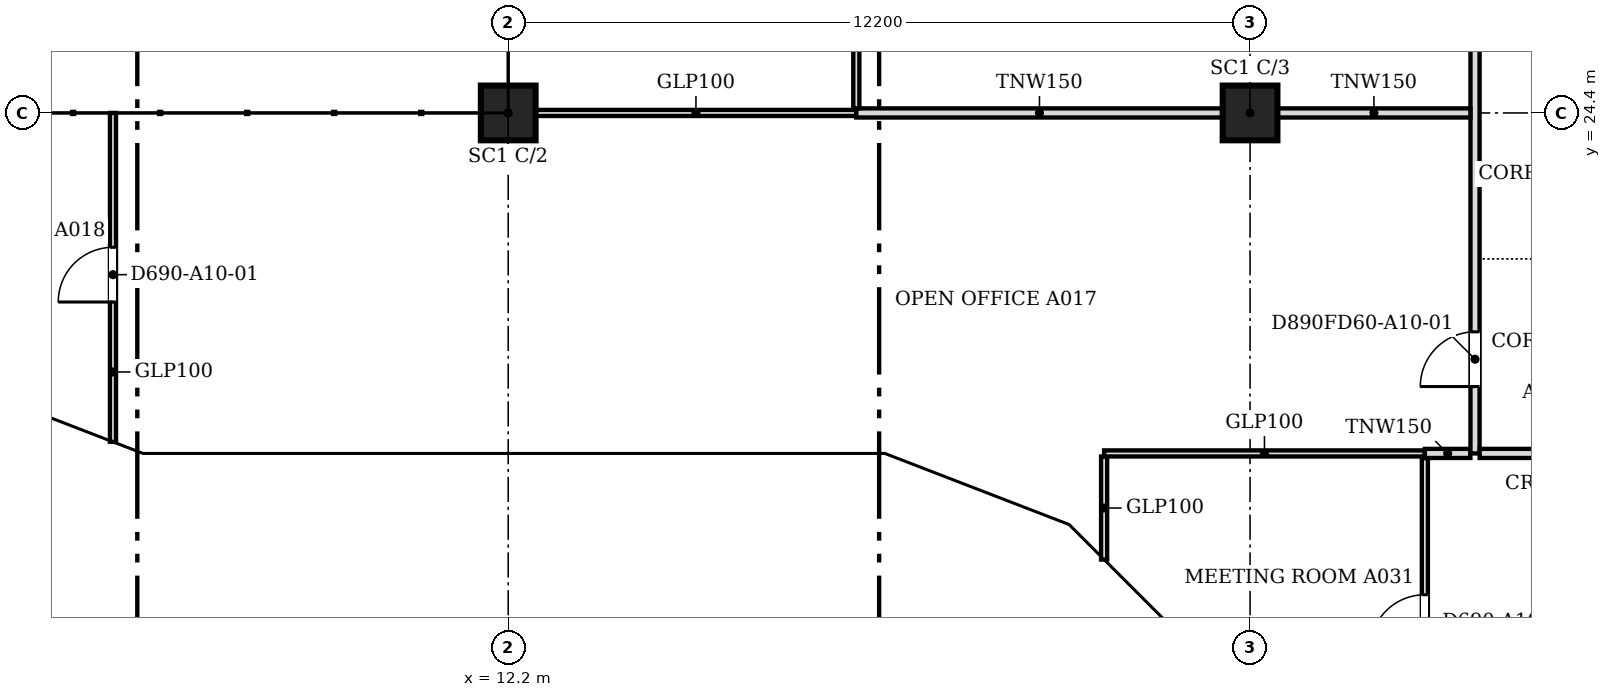
"""IFC4 building model, lengths in metres.
Left out: names, types, materials, properties, quantities, classifications, styles, units other than length and angle.
Written with IfcOpenShell. Run it as: python <this file> out.ifc"""

import sys

from ifc_helpers import new_model, si_unit, direction, frame, frame_2d, origin, origin_2d, place, context, subcontext, project, spatial, polyline, rectangle, outline, extrude, faceted_brep, source, transform, mapped, element, fill, save


model = new_model("IFC4")
c1 = context("Model", 3, precision=1e-05, world=origin(), true_north=direction((0.0, 1.0)))
c2 = subcontext(c1, "Body", "Model", "MODEL_VIEW")
j1 = project(units=[si_unit("LENGTHUNIT", "METRE"), si_unit("PLANEANGLEUNIT", "RADIAN")], contexts=[c1])
p1 = place(None, origin())
s1 = spatial("IfcSite", under=j1, at=p1, CompositionType="ELEMENT")
p2 = place(p1, origin())
s2 = spatial("IfcBuilding", under=s1, at=p2, CompositionType="ELEMENT")
p3 = place(p2, frame((0.0, 0.0, 112.6)))
s3 = spatial("IfcBuildingStorey", under=s2, at=p3, CompositionType="ELEMENT", Elevation=112.6)
for number, where, z_axis, x_axis in (
    (1, (12.2, 24.4, 0.0), (0.0, 0.0, 1.0), (1.0, 0.0, 0.0)),
    (2, (24.4, 24.4, 0.0), (0.0, 0.0, 1.0), (1.0, 0.0, 0.0)),
):
    element("IfcColumn", number, at=place(p3, frame(where, z_axis=z_axis, x_axis=x_axis)), inside=s3, PredefinedType="COLUMN", context=c2, shape_type="SweptSolid", body=[
        extrude(rectangle(XDim=0.9, YDim=0.9, at=origin_2d()), origin(), (0.0, 0.0, 1.0), 3.6),
    ])
m1 = source(origin(), c2, "Body", "Brep", [
    faceted_brep([(2.997, -0.25, 3.741), (2.95, -0.25, 3.8), (0.0, -0.25, 0.0), (2.997, -0.25, 0.0), (0.053, 0.25, 0.068), (2.904, 0.25, 3.74), (2.904, 0.25, 0.0), (0.053, 0.25, 0.0), (2.95, 0.0, 3.8), (0.0, 0.0, 0.0)], [[[0, 1, 2, 3]], [[4, 5, 6, 7]], [[8, 1, 0]], [[5, 4, 9, 2, 1, 8]], [[7, 6, 3, 2, 9]], [[7, 9, 4]], [[3, 6, 5, 8, 0]]]),
])
p4 = place(p3, frame((3.394, 19.612, 0.0), z_axis=(0.0, 0.0, 1.0), x_axis=(0.932990326376, -0.359901446078, 0.0)))
e3 = element("IfcWall", 3, at=p4, inside=s3, PredefinedType="SOLIDWALL", context=c2, shape_type="MappedRepresentation", body=[
    mapped(m1, transform((0.0, 0.0, 0.0), scale=1.0)),
])
m2 = source(origin(), c2, "Body", "SweptSolid", [
    extrude(outline(polyline([(2.75, 3.135), (0.511, 0.25), (2.75, 0.25), (2.75, 3.135)])), frame((0.0, 0.26, 0.0), z_axis=(0.0, -1.0, 0.0), x_axis=(1.0, 0.0, 0.0)), (0.0, 0.0, 1.0), 0.52),
])
p5 = place(p4, origin())
e4 = element("IfcOpeningElement", 4, at=p5, cuts=e3, PredefinedType="OPENING", context=c2, shape_type="MappedRepresentation", body=[
    mapped(m2, transform((0.0, 0.0, 0.0), scale=1.0)),
])
m3 = source(origin(), c2, "Body", "Brep", [
    faceted_brep([(3.05, -0.25, 0.0), (0.047, -0.25, 3.8), (0.0, -0.25, 3.74), (0.0, -0.25, 0.0), (0.093, 0.25, 3.741), (3.05, 0.25, 0.0), (0.093, 0.25, 0.0), (0.047, 0.0, 3.8)], [[[0, 1, 2, 3]], [[4, 5, 6]], [[5, 4, 7, 1, 0]], [[2, 1, 7]], [[6, 5, 0, 3]], [[6, 3, 2, 7, 4]]]),
])
p6 = place(p3, frame((6.1, 18.55, 0.0), z_axis=(0.0, 0.0, 1.0), x_axis=(1.0, 0.0, 0.0)))
e5 = element("IfcWall", 5, at=p6, inside=s3, PredefinedType="SOLIDWALL", context=c2, shape_type="MappedRepresentation", body=[
    mapped(m3, transform((0.0, 0.0, 0.0), scale=1.0)),
])
m4 = source(origin(), c2, "Body", "SweptSolid", [
    extrude(outline(polyline([(2.534, 0.25), (0.247, 3.144), (0.247, 0.25), (2.534, 0.25)])), frame((0.0, 0.26, 0.0), z_axis=(0.0, -1.0, 0.0), x_axis=(1.0, 0.0, 0.0)), (0.0, 0.0, 1.0), 0.52),
])
p7 = place(p6, origin())
e6 = element("IfcOpeningElement", 6, at=p7, cuts=e5, PredefinedType="OPENING", context=c2, shape_type="MappedRepresentation", body=[
    mapped(m4, transform((0.0, 0.0, 0.0), scale=1.0)),
])
m5 = source(origin(), c2, "Body", "SweptSolid", [
    extrude(outline(polyline([(6.1, 0.0), (3.05, 3.8), (0.0, 0.0), (6.1, 0.0)])), frame((0.0, 0.25, 0.0), z_axis=(0.0, -1.0, 0.0), x_axis=(1.0, 0.0, 0.0)), (0.0, 0.0, 1.0), 0.5),
])
p8 = place(p3, frame((9.15, 18.55, 0.0), z_axis=(0.0, 0.0, 1.0), x_axis=(1.0, 0.0, 0.0)))
e7 = element("IfcWall", 7, at=p8, inside=s3, PredefinedType="SOLIDWALL", context=c2, shape_type="MappedRepresentation", body=[
    mapped(m5, transform((0.0, 0.0, 0.0), scale=1.0)),
])
m6 = source(origin(), c2, "Body", "SweptSolid", [
    extrude(outline(polyline([(5.579, 0.25), (3.05, 3.4), (0.521, 0.25), (5.579, 0.25)])), frame((0.0, 0.26, 0.0), z_axis=(0.0, -1.0, 0.0), x_axis=(1.0, 0.0, 0.0)), (0.0, 0.0, 1.0), 0.52),
])
p9 = place(p8, origin())
e8 = element("IfcOpeningElement", 8, at=p9, cuts=e7, PredefinedType="OPENING", context=c2, shape_type="MappedRepresentation", body=[
    mapped(m6, transform((0.0, 0.0, 0.0), scale=1.0)),
])
m7 = source(origin(), c2, "Body", "Brep", [
    faceted_brep([(3.05, -0.25, 3.743), (0.0, -0.25, 0.0), (3.05, -0.25, 0.0), (0.0, 0.25, 0.0), (3.096, 0.25, 3.8), (3.143, 0.25, 3.743), (3.143, 0.25, 0.0), (3.096, -0.0, 3.8)], [[[0, 1, 2]], [[3, 4, 5, 6]], [[5, 4, 7]], [[4, 3, 1, 0, 7]], [[3, 6, 2, 1]], [[2, 6, 5, 7, 0]]]),
])
p10 = place(p3, frame((15.25, 18.55, 0.0), z_axis=(0.0, 0.0, 1.0), x_axis=(1.0, 0.0, 0.0)))
e9 = element("IfcWall", 9, at=p10, inside=s3, PredefinedType="SOLIDWALL", context=c2, shape_type="MappedRepresentation", body=[
    mapped(m7, transform((0.0, 0.0, 0.0), scale=1.0)),
])
m8 = source(origin(), c2, "Body", "SweptSolid", [
    extrude(outline(polyline([(2.896, 3.159), (0.526, 0.25), (2.896, 0.25), (2.896, 3.159)])), frame((0.0, 0.26, 0.0), z_axis=(0.0, -1.0, 0.0), x_axis=(1.0, 0.0, 0.0)), (0.0, 0.0, 1.0), 0.52),
])
p11 = place(p10, origin())
e10 = element("IfcOpeningElement", 10, at=p11, cuts=e9, PredefinedType="OPENING", context=c2, shape_type="MappedRepresentation", body=[
    mapped(m8, transform((0.0, 0.0, 0.0), scale=1.0)),
])
m9 = source(origin(), c2, "Body", "Brep", [
    faceted_brep([(3.143, -0.25, 0.064), (0.093, -0.25, 3.744), (0.093, -0.25, 0.0), (3.143, -0.25, 0.0), (0.0, 0.25, 3.743), (0.047, 0.25, 3.8), (3.196, 0.25, 0.0), (0.0, 0.25, 0.0), (0.047, 0.0, 3.8), (3.196, -0.0, 0.0)], [[[0, 1, 2, 3]], [[4, 5, 6, 7]], [[6, 5, 8, 1, 0, 9]], [[5, 4, 8]], [[7, 6, 9, 3, 2]], [[7, 2, 1, 8, 4]], [[3, 9, 0]]]),
])
p12 = place(p3, frame((18.303, 18.567, 0.0), z_axis=(0.0, 0.0, 1.0), x_axis=(0.932978940178, -0.359930961693, 0.0)))
e11 = element("IfcWall", 11, at=p12, inside=s3, PredefinedType="SOLIDWALL", context=c2, shape_type="MappedRepresentation", body=[
    mapped(m9, transform((0.0, 0.0, 0.0), scale=1.0)),
])
m10 = source(origin(), c2, "Body", "SweptSolid", [
    extrude(outline(polyline([(2.664, 0.25), (0.247, 3.167), (0.247, 0.25), (2.664, 0.25)])), frame((0.0, 0.26, 0.0), z_axis=(0.0, -1.0, 0.0), x_axis=(1.0, 0.0, 0.0)), (0.0, 0.0, 1.0), 0.52),
])
p13 = place(p12, origin())
e12 = element("IfcOpeningElement", 12, at=p13, cuts=e11, PredefinedType="OPENING", context=c2, shape_type="MappedRepresentation", body=[
    mapped(m10, transform((0.0, 0.0, 0.0), scale=1.0)),
])
m11 = source(origin(), c2, "Body", "Brep", [
    faceted_brep([(3.103, -0.25, 3.736), (0.053, -0.25, 0.064), (0.053, -0.25, 0.0), (3.103, -0.25, 0.0), (0.0, 0.25, 0.0), (3.156, 0.25, 3.8), (3.209, 0.25, 3.736), (3.209, 0.25, 0.0), (3.156, -0.0, 3.8), (0.0, 0.0, 0.0)], [[[0, 1, 2, 3]], [[4, 5, 6, 7]], [[6, 5, 8]], [[5, 4, 9, 1, 0, 8]], [[4, 7, 3, 2, 9]], [[9, 2, 1]], [[3, 7, 6, 8, 0]]]),
])
p14 = place(p3, frame((21.285, 17.417, 0.0), z_axis=(0.0, 0.0, 1.0), x_axis=(0.707106781187, -0.707106781187, 0.0)))
e13 = element("IfcWall", 13, at=p14, inside=s3, PredefinedType="SOLIDWALL", context=c2, shape_type="MappedRepresentation", body=[
    mapped(m11, transform((0.0, 0.0, 0.0), scale=1.0)),
])
m12 = source(origin(), c2, "Body", "SweptSolid", [
    extrude(outline(polyline([(2.956, 3.168), (0.533, 0.25), (2.956, 0.25), (2.956, 3.168)])), frame((0.0, 0.26, 0.0), z_axis=(0.0, -1.0, 0.0), x_axis=(1.0, 0.0, 0.0)), (0.0, 0.0, 1.0), 0.52),
])
p15 = place(p14, origin())
e14 = element("IfcOpeningElement", 14, at=p15, cuts=e13, PredefinedType="OPENING", context=c2, shape_type="MappedRepresentation", body=[
    mapped(m12, transform((0.0, 0.0, 0.0), scale=1.0)),
])
p16 = place(p2, frame((0.0, 0.0, 116.4)))
s4 = spatial("IfcBuildingStorey", under=s2, at=p16, CompositionType="ELEMENT", Elevation=116.4)
m13 = source(origin(), c2, "Body", "Brep", [
    faceted_brep([(0.053, -0.25, 0.0), (3.003, -0.25, 3.8), (0.053, -0.25, 7.6), (0.0, -0.25, 7.531), (0.0, -0.25, 0.068), (0.106, 0.25, 7.532), (2.957, 0.25, 3.86), (2.957, 0.25, 3.74), (0.106, 0.25, 0.068), (3.003, 0.0, 3.8), (0.053, 0.0, 0.0), (0.053, 0.0, 7.6)], [[[0, 1, 2, 3, 4]], [[5, 6, 7, 8]], [[8, 7, 9, 1, 0, 10]], [[6, 5, 11, 2, 1, 9]], [[3, 2, 11]], [[10, 0, 4]], [[8, 10, 4, 3, 11, 5]], [[9, 7, 6]]]),
])
p17 = place(p16, frame((3.344, 19.631, -3.8), z_axis=(0.0, 0.0, 1.0), x_axis=(0.933007896601, -0.359855894603, 0.0)))
e15 = element("IfcWall", 15, at=p17, inside=s4, PredefinedType="SOLIDWALL", context=c2, shape_type="MappedRepresentation", body=[
    mapped(m13, transform((0.0, 0.0, 0.0), scale=1.0)),
])
m14 = source(origin(), c2, "Body", "SweptSolid", [
    extrude(outline(polyline([(0.253, 0.665), (2.687, 3.8), (0.253, 6.935), (0.253, 0.665)])), frame((0.0, 0.26, 0.0), z_axis=(0.0, -1.0, 0.0), x_axis=(1.0, 0.0, 0.0)), (0.0, 0.0, 1.0), 0.52),
])
p18 = place(p17, origin())
e16 = element("IfcOpeningElement", 16, at=p18, cuts=e15, PredefinedType="OPENING", context=c2, shape_type="MappedRepresentation", body=[
    mapped(m14, transform((0.0, 0.0, 0.0), scale=1.0)),
])
m15 = source(origin(), c2, "Body", "Brep", [
    faceted_brep([(3.003, -0.25, 0.0), (6.053, -0.25, 3.8), (3.003, -0.25, 7.6), (0.0, -0.25, 3.8), (0.047, 0.25, 3.859), (3.003, 0.25, 7.6), (6.053, 0.25, 3.8), (3.003, 0.25, 0.0), (0.047, 0.25, 3.741), (0.0, 0.0, 3.8)], [[[0, 1, 2, 3]], [[4, 5, 6, 7, 8]], [[7, 6, 1, 0]], [[6, 5, 2, 1]], [[5, 4, 9, 3, 2]], [[8, 7, 0, 3, 9]], [[8, 9, 4]]]),
])
p19 = place(p16, frame((6.146, 18.55, -3.8), z_axis=(0.0, 0.0, 1.0), x_axis=(1.0, 0.0, 0.0)))
e17 = element("IfcWall", 17, at=p19, inside=s4, PredefinedType="SOLIDWALL", context=c2, shape_type="MappedRepresentation", body=[
    mapped(m15, transform((0.0, 0.0, 0.0), scale=1.0)),
])
m16 = source(origin(), c2, "Body", "SweptSolid", [
    extrude(outline(polyline([(3.005, 0.401), (5.733, 3.8), (3.005, 7.199), (0.319, 3.8), (3.005, 0.401)])), frame((0.0, 0.26, 0.0), z_axis=(0.0, -1.0, 0.0), x_axis=(1.0, 0.0, 0.0)), (0.0, 0.0, 1.0), 0.52),
])
p20 = place(p19, origin())
e18 = element("IfcOpeningElement", 18, at=p20, cuts=e17, PredefinedType="OPENING", context=c2, shape_type="MappedRepresentation", body=[
    mapped(m16, transform((0.0, 0.0, 0.0), scale=1.0)),
])
m17 = source(origin(), c2, "Body", "Brep", [
    faceted_brep([(3.05, -0.25, 0.0), (6.1, -0.25, 3.743), (6.1, -0.25, 3.857), (3.05, -0.25, 7.6), (0.0, -0.25, 3.8), (0.0, 0.25, 3.8), (3.05, 0.25, 7.6), (6.146, 0.25, 3.8), (3.05, 0.25, 0.0), (6.146, -0.0, 3.8)], [[[0, 1, 2, 3, 4]], [[5, 6, 7, 8]], [[8, 7, 9, 1, 0]], [[7, 6, 3, 2, 9]], [[6, 5, 4, 3]], [[5, 8, 0, 4]], [[1, 9, 2]]]),
])
p21 = place(p16, frame((12.2, 18.55, -3.8), z_axis=(0.0, 0.0, 1.0), x_axis=(1.0, 0.0, 0.0)))
e19 = element("IfcWall", 19, at=p21, inside=s4, PredefinedType="SOLIDWALL", context=c2, shape_type="MappedRepresentation", body=[
    mapped(m17, transform((0.0, 0.0, 0.0), scale=1.0)),
])
m18 = source(origin(), c2, "Body", "SweptSolid", [
    extrude(outline(polyline([(3.052, 0.397), (5.824, 3.8), (3.052, 7.202), (0.321, 3.8), (3.052, 0.397)])), frame((0.0, 0.26, 0.0), z_axis=(0.0, -1.0, 0.0), x_axis=(1.0, 0.0, 0.0)), (0.0, 0.0, 1.0), 0.52),
])
p22 = place(p21, origin())
e20 = element("IfcOpeningElement", 20, at=p22, cuts=e19, PredefinedType="OPENING", context=c2, shape_type="MappedRepresentation", body=[
    mapped(m18, transform((0.0, 0.0, 0.0), scale=1.0)),
])
m19 = source(origin(), c2, "Body", "Brep", [
    faceted_brep([(3.096, -0.25, 7.536), (0.047, -0.25, 3.856), (0.047, -0.25, 3.744), (3.096, -0.25, 0.064), (0.0, 0.25, 3.8), (3.149, 0.25, 7.6), (3.202, 0.25, 7.536), (3.202, 0.25, 0.064), (3.149, 0.25, 0.0), (3.149, -0.0, 0.0), (3.149, -0.0, 7.6), (0.0, 0.0, 3.8)], [[[0, 1, 2, 3]], [[4, 5, 6, 7, 8]], [[8, 7, 9]], [[6, 5, 10]], [[5, 4, 11, 1, 0, 10]], [[4, 8, 9, 3, 2, 11]], [[11, 2, 1]], [[3, 9, 7, 6, 10, 0]]]),
])
p23 = place(p16, frame((18.346, 18.55, -3.8), z_axis=(0.0, 0.0, 1.0), x_axis=(0.932985567668, -0.359913782069, 0.0)))
e21 = element("IfcWall", 21, at=p23, inside=s4, PredefinedType="SOLIDWALL", context=c2, shape_type="MappedRepresentation", body=[
    mapped(m19, transform((0.0, 0.0, 0.0), scale=1.0)),
])
m20 = source(origin(), c2, "Body", "SweptSolid", [
    extrude(outline(polyline([(2.949, 6.967), (0.325, 3.8), (2.949, 0.633), (2.949, 6.967)])), frame((0.0, 0.26, 0.0), z_axis=(0.0, -1.0, 0.0), x_axis=(1.0, 0.0, 0.0)), (0.0, 0.0, 1.0), 0.52),
])
p24 = place(p23, origin())
e22 = element("IfcOpeningElement", 22, at=p24, cuts=e21, PredefinedType="OPENING", context=c2, shape_type="MappedRepresentation", body=[
    mapped(m20, transform((0.0, 0.0, 0.0), scale=1.0)),
])
m21 = source(origin(), c2, "Body", "Brep", [
    faceted_brep([(0.106, -0.25, 0.064), (3.156, -0.25, 3.736), (3.156, -0.25, 3.864), (0.106, -0.25, 7.536), (0.0, 0.25, 7.536), (0.053, 0.25, 7.6), (3.209, 0.25, 3.8), (0.053, 0.25, 0.0), (0.0, 0.25, 0.064), (3.209, -0.0, 3.8), (0.053, 0.0, 0.0), (0.053, 0.0, 7.6)], [[[0, 1, 2, 3]], [[4, 5, 6, 7, 8]], [[7, 6, 9, 1, 0, 10]], [[6, 5, 11, 3, 2, 9]], [[5, 4, 11]], [[8, 7, 10]], [[8, 10, 0, 3, 11, 4]], [[1, 9, 2]]]),
])
p25 = place(p16, frame((21.248, 17.454, -3.8), z_axis=(0.0, 0.0, 1.0), x_axis=(0.707106781187, -0.707106781187, 0.0)))
e23 = element("IfcWall", 23, at=p25, inside=s4, PredefinedType="SOLIDWALL", context=c2, shape_type="MappedRepresentation", body=[
    mapped(m21, transform((0.0, 0.0, 0.0), scale=1.0)),
])
m22 = source(origin(), c2, "Body", "SweptSolid", [
    extrude(outline(polyline([(0.253, 0.632), (2.884, 3.8), (0.253, 6.968), (0.253, 0.632)])), frame((0.0, 0.26, 0.0), z_axis=(0.0, -1.0, 0.0), x_axis=(1.0, 0.0, 0.0)), (0.0, 0.0, 1.0), 0.52),
])
p26 = place(p25, origin())
e24 = element("IfcOpeningElement", 24, at=p26, cuts=e23, PredefinedType="OPENING", context=c2, shape_type="MappedRepresentation", body=[
    mapped(m22, transform((0.0, 0.0, 0.0), scale=1.0)),
])
p27 = place(p3, frame((27.275, 13.276, 0.0), z_axis=(0.0, 0.0, 1.0), x_axis=(0.0, 1.0, 0.0)))
e25 = element("IfcWall", 25, at=p27, inside=s3, PredefinedType="PARTITIONING", context=c2, shape_type="SweptSolid", body=[
    extrude(rectangle(XDim=5.448, YDim=0.1, at=frame_2d((2.724, 0.0))), origin(), (0.0, 0.0, 1.0), 3.067),
])
m23 = source(origin(), c2, "Body", "SweptSolid", [
    extrude(rectangle(XDim=0.9, YDim=2.1, at=frame_2d((0.45, 1.05))), frame((0.0, 0.06, 0.0), z_axis=(0.0, -1.0, 0.0), x_axis=(1.0, 0.0, 0.0)), (0.0, 0.0, 1.0), 0.12),
])
p28 = place(p27, frame((2.3, 0.0, 0.0)))
e26 = element("IfcOpeningElement", 26, at=p28, cuts=e25, PredefinedType="OPENING", context=c2, shape_type="MappedRepresentation", body=[
    mapped(m23, transform((0.0, 0.0, 0.0), scale=1.0)),
])
p29 = place(p3, frame((22.0, 17.055, 0.0), z_axis=(0.0, 0.0, 1.0), x_axis=(0.0, 1.0, 0.0)))
e27 = element("IfcWall", 27, at=p29, inside=s3, PredefinedType="PARTITIONING", context=c2, shape_type="SweptSolid", body=[
    extrude(rectangle(XDim=1.694, YDim=0.1, at=frame_2d((0.847, 0.0))), origin(), (0.0, 0.0, 1.0), 3.067),
])
p30 = place(p3, frame((22.0, 18.8, 0.0), z_axis=(0.0, 0.0, 1.0), x_axis=(1.0, 0.0, 0.0)))
e28 = element("IfcWall", 28, at=p30, inside=s3, PredefinedType="PARTITIONING", context=c2, shape_type="SweptSolid", body=[
    extrude(rectangle(XDim=5.274, YDim=0.1, at=frame_2d((2.637, 0.0))), origin(), (0.0, 0.0, 1.0), 3.067),
])
p31 = place(p3, frame((27.275, 18.8, 0.0), z_axis=(0.0, 0.0, 1.0), x_axis=(1.0, 0.0, 0.0)))
e29 = element("IfcWall", 29, at=p31, inside=s3, PredefinedType="PARTITIONING", context=c2, shape_type="SweptSolid", body=[
    extrude(rectangle(XDim=0.749, YDim=0.15, at=frame_2d((0.375, 0.0))), origin(), (0.0, 0.0, 1.0), 3.067),
])
p32 = place(p3, frame((28.1, 18.8, 0.0), z_axis=(0.0, 0.0, 1.0), x_axis=(0.0, 1.0, 0.0)))
e30 = element("IfcWall", 30, at=p32, inside=s3, PredefinedType="PARTITIONING", context=c2, shape_type="SweptSolid", body=[
    extrude(rectangle(XDim=26.024, YDim=0.15, at=frame_2d((13.012, 0.0))), origin(), (0.0, 0.0, 1.0), 3.067),
])
m24 = source(origin(), c2, "Body", "SweptSolid", [
    extrude(rectangle(XDim=0.9, YDim=2.1, at=frame_2d((0.45, 1.05))), frame((0.0, 0.085, 0.0), z_axis=(0.0, -1.0, 0.0), x_axis=(1.0, 0.0, 0.0)), (0.0, 0.0, 1.0), 0.17),
])
p33 = place(p32, frame((1.1, 0.0, 0.0)))
e31 = element("IfcOpeningElement", 31, at=p33, cuts=e30, PredefinedType="OPENING", context=c2, shape_type="MappedRepresentation", body=[
    mapped(m24, transform((0.0, 0.0, 0.0), scale=1.0)),
])
p34 = place(p32, frame((14.301, 0.0, 0.0)))
e32 = element("IfcOpeningElement", 32, at=p34, cuts=e30, PredefinedType="OPENING", context=c2, shape_type="MappedRepresentation", body=[
    mapped(m24, transform((0.0, 0.0, 0.0), scale=1.0)),
])
p35 = place(p32, frame((8.2, 0.0, 0.0)))
e33 = element("IfcOpeningElement", 33, at=p35, cuts=e30, PredefinedType="OPENING", context=c2, shape_type="MappedRepresentation", body=[
    mapped(m24, transform((0.0, 0.0, 0.0), scale=1.0)),
])
p36 = place(p32, frame((21.5, 0.0, 0.0)))
e34 = element("IfcOpeningElement", 34, at=p36, cuts=e30, PredefinedType="OPENING", context=c2, shape_type="MappedRepresentation", body=[
    mapped(m24, transform((0.0, 0.0, 0.0), scale=1.0)),
])
p37 = place(p3, frame((28.176, 18.8, 0.0), z_axis=(0.0, 0.0, 1.0), x_axis=(1.0, 0.0, 0.0)))
e35 = element("IfcWall", 35, at=p37, inside=s3, PredefinedType="PARTITIONING", context=c2, shape_type="SweptSolid", body=[
    extrude(rectangle(XDim=2.248, YDim=0.15, at=frame_2d((1.124, 0.0))), origin(), (0.0, 0.0, 1.0), 3.067),
])
p38 = place(p3, frame((5.7, 18.99, 0.0), z_axis=(0.0, 0.0, 1.0), x_axis=(0.0, 1.0, 0.0)))
e36 = element("IfcWall", 36, at=p38, inside=s3, PredefinedType="PARTITIONING", context=c2, shape_type="SweptSolid", body=[
    extrude(rectangle(XDim=5.41, YDim=0.1, at=frame_2d((2.705, 0.0))), origin(), (0.0, 0.0, 1.0), 3.067),
])
p39 = place(p38, frame((2.3, 0.0, 0.0)))
e37 = element("IfcOpeningElement", 37, at=p39, cuts=e36, PredefinedType="OPENING", context=c2, shape_type="MappedRepresentation", body=[
    mapped(m23, transform((0.0, 0.0, 0.0), scale=1.0)),
])
p40 = place(p3, frame((12.651, 24.4, 0.0), z_axis=(0.0, 0.0, 1.0), x_axis=(1.0, 0.0, 0.0)))
e38 = element("IfcWall", 38, at=p40, inside=s3, PredefinedType="PARTITIONING", context=c2, shape_type="SweptSolid", body=[
    extrude(rectangle(XDim=5.273, YDim=0.1, at=frame_2d((2.637, 0.0))), origin(), (0.0, 0.0, 1.0), 3.067),
])
p41 = place(p3, frame((17.925, 24.4, 0.0), z_axis=(0.0, 0.0, 1.0), x_axis=(1.0, 0.0, 0.0)))
e39 = element("IfcWall", 39, at=p41, inside=s3, PredefinedType="PARTITIONING", context=c2, shape_type="SweptSolid", body=[
    extrude(rectangle(XDim=6.024, YDim=0.15, at=frame_2d((3.012, 0.0))), origin(), (0.0, 0.0, 1.0), 3.067),
])
p42 = place(p3, frame((24.851, 24.4, 0.0), z_axis=(0.0, 0.0, 1.0), x_axis=(1.0, 0.0, 0.0)))
e40 = element("IfcWall", 40, at=p42, inside=s3, PredefinedType="PARTITIONING", context=c2, shape_type="SweptSolid", body=[
    extrude(rectangle(XDim=3.173, YDim=0.15, at=frame_2d((1.586, 0.0))), origin(), (0.0, 0.0, 1.0), 3.067),
])
p43 = place(p3, frame((17.925, 24.476, 0.0), z_axis=(0.0, 0.0, 1.0), x_axis=(0.0, 1.0, 0.0)))
e41 = element("IfcWall", 41, at=p43, inside=s3, PredefinedType="PARTITIONING", context=c2, shape_type="SweptSolid", body=[
    extrude(rectangle(XDim=5.948, YDim=0.1, at=frame_2d((2.974, 0.0))), origin(), (0.0, 0.0, 1.0), 3.067),
])
p44 = place(p43, frame((2.5, 0.0, 0.0)))
e42 = element("IfcOpeningElement", 42, at=p44, cuts=e41, PredefinedType="OPENING", context=c2, shape_type="MappedRepresentation", body=[
    mapped(m23, transform((0.0, 0.0, 0.0), scale=1.0)),
])
m25 = source(origin(), c2, "Body", "SweptSolid", [
    extrude(rectangle(XDim=0.9, YDim=2.1, at=frame_2d((0.45, 1.05))), frame((0.0, 0.025, 0.0), z_axis=(0.0, -1.0, 0.0), x_axis=(1.0, 0.0, 0.0)), (0.0, 0.0, 1.0), 0.05),
])
p45 = place(p33, origin())
e43 = element("IfcDoor", 43, at=p45, inside=s3, OperationType="SINGLE_SWING_LEFT", PredefinedType="DOOR", context=c2, shape_type="MappedRepresentation", body=[
    mapped(m25, transform((0.0, 0.0, 0.0), scale=1.0)),
])
fill(e31, e43)
p46 = place(p39, origin())
e44 = element("IfcDoor", 44, at=p46, inside=s3, OperationType="SINGLE_SWING_LEFT", PredefinedType="DOOR", context=c2, shape_type="MappedRepresentation", body=[
    mapped(m25, transform((0.0, 0.0, 0.0), scale=1.0)),
])
fill(e37, e44)
p47 = place(p28, origin())
e45 = element("IfcDoor", 45, at=p47, inside=s3, OperationType="SINGLE_SWING_LEFT", PredefinedType="DOOR", context=c2, shape_type="MappedRepresentation", body=[
    mapped(m25, transform((0.0, 0.0, 0.0), scale=1.0)),
])
fill(e26, e45)
save(model, sys.argv[1])
